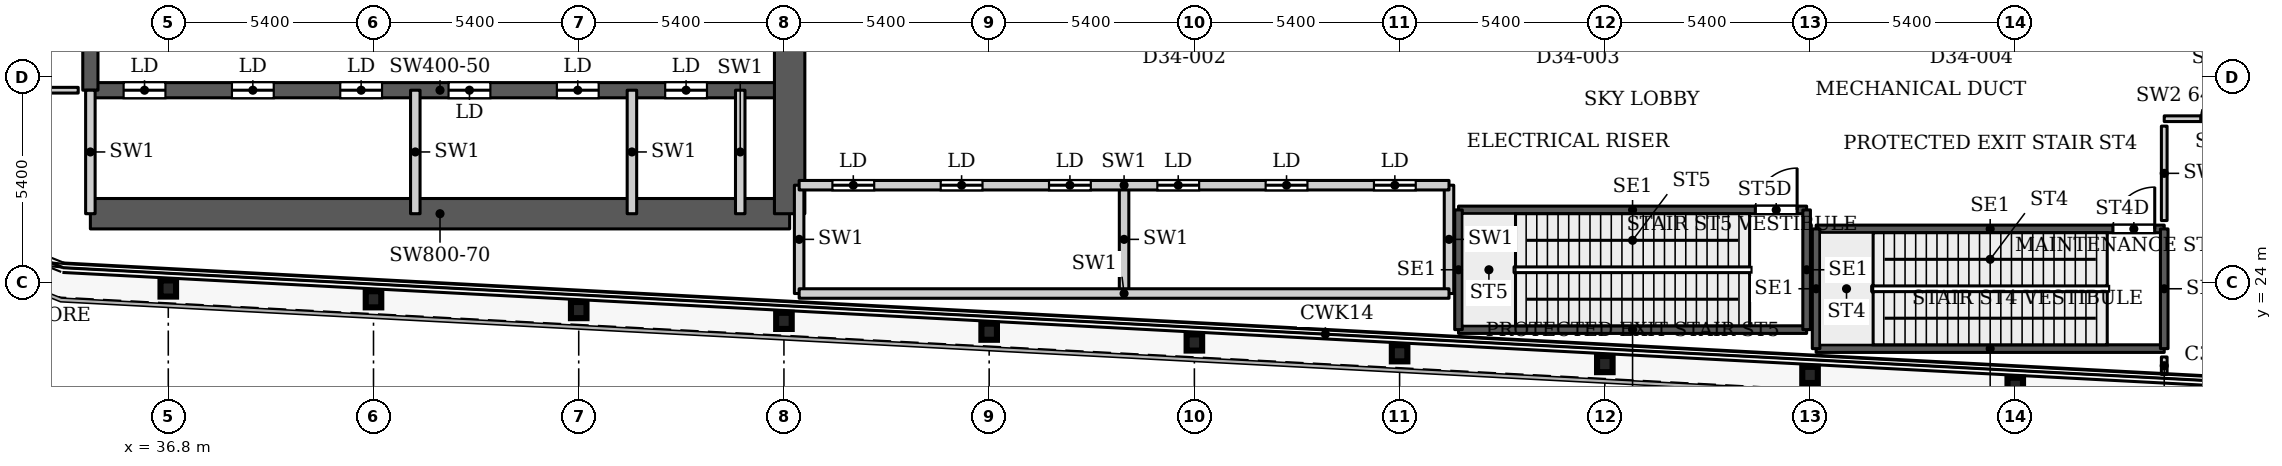
"""IFC4 building model, lengths in metres.
Left out: names, types, materials, properties, quantities, classifications, styles, units other than length and angle.
Written with IfcOpenShell. Run it as: python <this file> out.ifc"""

import sys

from ifc_helpers import new_model, si_unit, direction, frame, frame_2d, origin, origin_2d, place, context, subcontext, project, spatial, rectangle, i_section, extrude, source, transform, mapped, element, fill, save


model = new_model("IFC4")
c1 = context("Model", 3, precision=1e-05, world=origin(), true_north=direction((0.0, 1.0)))
c2 = subcontext(c1, "Body", "Model", "MODEL_VIEW")
j1 = project(units=[si_unit("LENGTHUNIT", "METRE"), si_unit("PLANEANGLEUNIT", "RADIAN")], contexts=[c1])
p1 = place(None, origin())
s1 = spatial("IfcSite", under=j1, at=p1, CompositionType="ELEMENT")
p2 = place(p1, origin())
s2 = spatial("IfcBuilding", under=s1, at=p2, CompositionType="ELEMENT")
p3 = place(p2, frame((0.0, 0.0, 144.8)))
s3 = spatial("IfcBuildingStorey", under=s2, at=p3, CompositionType="ELEMENT", Elevation=144.8)
for number, where, z_axis, x_axis in (
    (1, (85.4, 21.274, 0.0), (0.0, 0.0, 1.0), (1.0, 0.0, 0.0)),
    (2, (80.0, 21.558, 0.0), (0.0, 0.0, 1.0), (1.0, 0.0, 0.0)),
    (3, (74.6, 21.843, 0.0), (0.0, 0.0, 1.0), (1.0, 0.0, 0.0)),
    (4, (69.2, 22.127, 0.0), (0.0, 0.0, 1.0), (1.0, 0.0, 0.0)),
    (5, (63.8, 22.411, 0.0), (0.0, 0.0, 1.0), (1.0, 0.0, 0.0)),
    (6, (58.4, 22.695, 0.0), (0.0, 0.0, 1.0), (1.0, 0.0, 0.0)),
    (7, (53.0, 22.98, 0.0), (0.0, 0.0, 1.0), (1.0, 0.0, 0.0)),
    (8, (47.6, 23.264, 0.0), (0.0, 0.0, 1.0), (1.0, 0.0, 0.0)),
    (9, (42.2, 23.548, 0.0), (0.0, 0.0, 1.0), (1.0, 0.0, 0.0)),
    (10, (36.8, 23.832, 0.0), (0.0, 0.0, 1.0), (1.0, 0.0, 0.0)),
):
    element("IfcColumn", number, at=place(p3, frame(where, z_axis=z_axis, x_axis=x_axis)), inside=s3, PredefinedType="COLUMN", context=c2, shape_type="SweptSolid", body=[
        extrude(i_section(OverallWidth=0.409, OverallDepth=0.425, WebThickness=0.033, FlangeThickness=0.052, FilletRadius=0.013, at=origin_2d()), origin(), (0.0, 0.0, 1.0), 7.8),
    ])
p4 = place(p3, frame((34.75, 25.8, 0.0), z_axis=(0.0, 0.0, 1.0), x_axis=(1.0, 0.0, 0.0)))
e11 = element("IfcWall", 11, at=p4, inside=s3, PredefinedType="SHEAR", context=c2, shape_type="SweptSolid", body=[
    extrude(rectangle(XDim=18.4, YDim=0.8, at=frame_2d((9.2, 0.0))), origin(), (0.0, 0.0, 1.0), 7.8),
])
p5 = place(p3, frame((34.75, 29.05, 0.0), z_axis=(0.0, 0.0, 1.0), x_axis=(1.0, 0.0, 0.0)))
e12 = element("IfcWall", 12, at=p5, inside=s3, PredefinedType="SHEAR", context=c2, shape_type="SweptSolid", body=[
    extrude(rectangle(XDim=18.4, YDim=0.4, at=frame_2d((9.2, 0.0))), origin(), (0.0, 0.0, 1.0), 7.8),
])
p6 = place(p5, frame((0.875, 0.0, 0.0)))
e13 = element("IfcOpeningElement", 13, at=p6, cuts=e12, PredefinedType="OPENING", context=c2, shape_type="SweptSolid", body=[
    extrude(rectangle(XDim=1.1, YDim=2.2, at=frame_2d((0.55, 1.1))), frame((0.0, 0.21, 0.0), z_axis=(0.0, -1.0, 0.0), x_axis=(1.0, 0.0, 0.0)), (0.0, 0.0, 1.0), 0.42),
])
p7 = place(p5, frame((3.725, 0.0, 0.0)))
e14 = element("IfcOpeningElement", 14, at=p7, cuts=e12, PredefinedType="OPENING", context=c2, shape_type="SweptSolid", body=[
    extrude(rectangle(XDim=1.1, YDim=2.2, at=frame_2d((0.55, 1.1))), frame((0.0, 0.21, 0.0), z_axis=(0.0, -1.0, 0.0), x_axis=(1.0, 0.0, 0.0)), (0.0, 0.0, 1.0), 0.42),
])
p8 = place(p5, frame((6.575, 0.0, 0.0)))
e15 = element("IfcOpeningElement", 15, at=p8, cuts=e12, PredefinedType="OPENING", context=c2, shape_type="SweptSolid", body=[
    extrude(rectangle(XDim=1.1, YDim=2.2, at=frame_2d((0.55, 1.1))), frame((0.0, 0.21, 0.0), z_axis=(0.0, -1.0, 0.0), x_axis=(1.0, 0.0, 0.0)), (0.0, 0.0, 1.0), 0.42),
])
p9 = place(p5, frame((9.425, 0.0, 0.0)))
e16 = element("IfcOpeningElement", 16, at=p9, cuts=e12, PredefinedType="OPENING", context=c2, shape_type="SweptSolid", body=[
    extrude(rectangle(XDim=1.1, YDim=2.2, at=frame_2d((0.55, 1.1))), frame((0.0, 0.21, 0.0), z_axis=(0.0, -1.0, 0.0), x_axis=(1.0, 0.0, 0.0)), (0.0, 0.0, 1.0), 0.42),
])
p10 = place(p5, frame((12.275, 0.0, 0.0)))
e17 = element("IfcOpeningElement", 17, at=p10, cuts=e12, PredefinedType="OPENING", context=c2, shape_type="SweptSolid", body=[
    extrude(rectangle(XDim=1.1, YDim=2.2, at=frame_2d((0.55, 1.1))), frame((0.0, 0.21, 0.0), z_axis=(0.0, -1.0, 0.0), x_axis=(1.0, 0.0, 0.0)), (0.0, 0.0, 1.0), 0.42),
])
p11 = place(p5, frame((15.125, 0.0, 0.0)))
e18 = element("IfcOpeningElement", 18, at=p11, cuts=e12, PredefinedType="OPENING", context=c2, shape_type="SweptSolid", body=[
    extrude(rectangle(XDim=1.1, YDim=2.2, at=frame_2d((0.55, 1.1))), frame((0.0, 0.21, 0.0), z_axis=(0.0, -1.0, 0.0), x_axis=(1.0, 0.0, 0.0)), (0.0, 0.0, 1.0), 0.42),
])
p12 = place(p3, frame((34.75, 29.05, 0.0), z_axis=(0.0, 0.0, 1.0), x_axis=(0.0, 1.0, 0.0)))
e19 = element("IfcWall", 19, at=p12, inside=s3, PredefinedType="SHEAR", context=c2, shape_type="SweptSolid", body=[
    extrude(rectangle(XDim=18.45, YDim=0.4, at=frame_2d((9.225, 0.0))), origin(), (0.0, 0.0, 1.0), 7.8),
])
p13 = place(p12, frame((8.025, 0.0, 0.0)))
e20 = element("IfcOpeningElement", 20, at=p13, cuts=e19, PredefinedType="OPENING", context=c2, shape_type="SweptSolid", body=[
    extrude(rectangle(XDim=1.1, YDim=2.2, at=frame_2d((0.55, 1.1))), frame((0.0, 0.21, 0.0), z_axis=(0.0, -1.0, 0.0), x_axis=(1.0, 0.0, 0.0)), (0.0, 0.0, 1.0), 0.42),
])
p14 = place(p12, frame((10.875, 0.0, 0.0)))
e21 = element("IfcOpeningElement", 21, at=p14, cuts=e19, PredefinedType="OPENING", context=c2, shape_type="SweptSolid", body=[
    extrude(rectangle(XDim=1.1, YDim=2.2, at=frame_2d((0.55, 1.1))), frame((0.0, 0.21, 0.0), z_axis=(0.0, -1.0, 0.0), x_axis=(1.0, 0.0, 0.0)), (0.0, 0.0, 1.0), 0.42),
])
p15 = place(p12, frame((13.725, 0.0, 0.0)))
e22 = element("IfcOpeningElement", 22, at=p15, cuts=e19, PredefinedType="OPENING", context=c2, shape_type="SweptSolid", body=[
    extrude(rectangle(XDim=1.1, YDim=2.2, at=frame_2d((0.55, 1.1))), frame((0.0, 0.21, 0.0), z_axis=(0.0, -1.0, 0.0), x_axis=(1.0, 0.0, 0.0)), (0.0, 0.0, 1.0), 0.42),
])
p16 = place(p12, frame((15.95, 0.0, 0.0)))
e23 = element("IfcOpeningElement", 23, at=p16, cuts=e19, PredefinedType="OPENING", context=c2, shape_type="SweptSolid", body=[
    extrude(rectangle(XDim=1.1, YDim=2.2, at=frame_2d((0.55, 1.1))), frame((0.0, 0.21, 0.0), z_axis=(0.0, -1.0, 0.0), x_axis=(1.0, 0.0, 0.0)), (0.0, 0.0, 1.0), 0.42),
])
p17 = place(p3, frame((53.15, 25.8, 0.0), z_axis=(0.0, 0.0, 1.0), x_axis=(0.0, 1.0, 0.0)))
e24 = element("IfcWall", 24, at=p17, inside=s3, PredefinedType="SHEAR", context=c2, shape_type="SweptSolid", body=[
    extrude(rectangle(XDim=10.4, YDim=0.8, at=frame_2d((5.2, 0.0))), origin(), (0.0, 0.0, 1.0), 7.8),
])
p18 = place(p17, frame((6.65, 0.0, 0.0)))
e25 = element("IfcOpeningElement", 25, at=p18, cuts=e24, PredefinedType="OPENING", context=c2, shape_type="SweptSolid", body=[
    extrude(rectangle(XDim=1.8, YDim=2.1, at=frame_2d((0.9, 1.05))), frame((0.0, 0.41, 0.0), z_axis=(0.0, -1.0, 0.0), x_axis=(1.0, 0.0, 0.0)), (0.0, 0.0, 1.0), 0.82),
])
p19 = place(p3, frame((80.16, 22.25, 0.0), z_axis=(0.0, 0.0, 1.0), x_axis=(1.0, 0.0, 0.0)))
e26 = element("IfcWall", 26, at=p19, inside=s3, PredefinedType="SHEAR", context=c2, shape_type="SweptSolid", body=[
    extrude(rectangle(XDim=9.16, YDim=0.2, at=frame_2d((4.58, 0.0))), origin(), (0.0, 0.0, 1.0), 7.8),
])
p20 = place(p3, frame((80.16, 25.4, 0.0), z_axis=(0.0, 0.0, 1.0), x_axis=(1.0, 0.0, 0.0)))
e27 = element("IfcWall", 27, at=p20, inside=s3, PredefinedType="SHEAR", context=c2, shape_type="SweptSolid", body=[
    extrude(rectangle(XDim=9.16, YDim=0.2, at=frame_2d((4.58, 0.0))), origin(), (0.0, 0.0, 1.0), 7.8),
])
p21 = place(p20, frame((7.81, 0.0, 0.0)))
e28 = element("IfcOpeningElement", 28, at=p21, cuts=e27, PredefinedType="OPENING", context=c2, shape_type="SweptSolid", body=[
    extrude(rectangle(XDim=1.1, YDim=2.2, at=frame_2d((0.55, 1.1))), frame((0.0, 0.11, 0.0), z_axis=(0.0, -1.0, 0.0), x_axis=(1.0, 0.0, 0.0)), (0.0, 0.0, 1.0), 0.22),
])
for number, where, z_axis, x_axis in (
    (29, (80.16, 22.25, 0.0), (0.0, 0.0, 1.0), (0.0, 1.0, 0.0)),
    (30, (89.32, 22.25, 0.0), (0.0, 0.0, 1.0), (0.0, 1.0, 0.0)),
):
    element("IfcWall", number, at=place(p3, frame(where, z_axis=z_axis, x_axis=x_axis)), inside=s3, PredefinedType="SHEAR", context=c2, shape_type="SweptSolid", body=[
        extrude(rectangle(XDim=3.15, YDim=0.2, at=frame_2d((1.575, 0.0))), origin(), (0.0, 0.0, 1.0), 7.8),
    ])
p22 = place(p3, frame((70.75, 22.75, 0.0), z_axis=(0.0, 0.0, 1.0), x_axis=(1.0, 0.0, 0.0)))
e31 = element("IfcWall", 31, at=p22, inside=s3, PredefinedType="SHEAR", context=c2, shape_type="SweptSolid", body=[
    extrude(rectangle(XDim=9.16, YDim=0.2, at=frame_2d((4.58, 0.0))), origin(), (0.0, 0.0, 1.0), 7.8),
])
p23 = place(p3, frame((70.75, 25.9, 0.0), z_axis=(0.0, 0.0, 1.0), x_axis=(1.0, 0.0, 0.0)))
e32 = element("IfcWall", 32, at=p23, inside=s3, PredefinedType="SHEAR", context=c2, shape_type="SweptSolid", body=[
    extrude(rectangle(XDim=9.16, YDim=0.2, at=frame_2d((4.58, 0.0))), origin(), (0.0, 0.0, 1.0), 7.8),
])
p24 = place(p23, frame((7.81, 0.0, 0.0)))
e33 = element("IfcOpeningElement", 33, at=p24, cuts=e32, PredefinedType="OPENING", context=c2, shape_type="SweptSolid", body=[
    extrude(rectangle(XDim=1.1, YDim=2.2, at=frame_2d((0.55, 1.1))), frame((0.0, 0.11, 0.0), z_axis=(0.0, -1.0, 0.0), x_axis=(1.0, 0.0, 0.0)), (0.0, 0.0, 1.0), 0.22),
])
for number, where, z_axis, x_axis in (
    (34, (70.75, 22.75, 0.0), (0.0, 0.0, 1.0), (0.0, 1.0, 0.0)),
    (35, (79.91, 22.75, 0.0), (0.0, 0.0, 1.0), (0.0, 1.0, 0.0)),
):
    element("IfcWall", number, at=place(p3, frame(where, z_axis=z_axis, x_axis=x_axis)), inside=s3, PredefinedType="SHEAR", context=c2, shape_type="SweptSolid", body=[
        extrude(rectangle(XDim=3.15, YDim=0.2, at=frame_2d((1.575, 0.0))), origin(), (0.0, 0.0, 1.0), 7.8),
    ])
for number, where, z_axis, x_axis in (
    (36, (34.75, 25.8, 0.0), (0.0, 0.0, 1.0), (0.0, 1.0, 0.0)),
    (37, (43.3, 25.8, 0.0), (0.0, 0.0, 1.0), (0.0, 1.0, 0.0)),
    (38, (49.0, 25.8, 0.0), (0.0, 0.0, 1.0), (0.0, 1.0, 0.0)),
    (39, (51.85, 25.8, 0.0), (0.0, 0.0, 1.0), (0.0, 1.0, 0.0)),
):
    element("IfcWall", number, at=place(p3, frame(where, z_axis=z_axis, x_axis=x_axis)), inside=s3, PredefinedType="PARTITIONING", context=c2, shape_type="SweptSolid", body=[
        extrude(rectangle(XDim=3.25, YDim=0.25, at=frame_2d((1.625, 0.0))), origin(), (0.0, 0.0, 1.0), 7.8),
    ])
for number, where, z_axis, x_axis in (
    (40, (53.4, 23.7, 0.0), (0.0, 0.0, 1.0), (0.0, 1.0, 0.0)),
    (41, (61.95, 23.7, 0.0), (0.0, 0.0, 1.0), (0.0, 1.0, 0.0)),
    (42, (70.5, 23.7, 0.0), (0.0, 0.0, 1.0), (0.0, 1.0, 0.0)),
):
    element("IfcWall", number, at=place(p3, frame(where, z_axis=z_axis, x_axis=x_axis)), inside=s3, PredefinedType="PARTITIONING", context=c2, shape_type="SweptSolid", body=[
        extrude(rectangle(XDim=2.85, YDim=0.25, at=frame_2d((1.425, 0.0))), origin(), (0.0, 0.0, 1.0), 7.8),
    ])
p25 = place(p3, frame((53.4, 23.7, 0.0), z_axis=(0.0, 0.0, 1.0), x_axis=(1.0, 0.0, 0.0)))
e43 = element("IfcWall", 43, at=p25, inside=s3, PredefinedType="PARTITIONING", context=c2, shape_type="SweptSolid", body=[
    extrude(rectangle(XDim=17.1, YDim=0.25, at=frame_2d((8.55, 0.0))), origin(), (0.0, 0.0, 1.0), 7.8),
])
p26 = place(p3, frame((53.4, 26.55, 0.0), z_axis=(0.0, 0.0, 1.0), x_axis=(1.0, 0.0, 0.0)))
e44 = element("IfcWall", 44, at=p26, inside=s3, PredefinedType="PARTITIONING", context=c2, shape_type="SweptSolid", body=[
    extrude(rectangle(XDim=17.1, YDim=0.25, at=frame_2d((8.55, 0.0))), origin(), (0.0, 0.0, 1.0), 7.8),
])
p27 = place(p26, frame((0.875, 0.0, 0.0)))
e45 = element("IfcOpeningElement", 45, at=p27, cuts=e44, PredefinedType="OPENING", context=c2, shape_type="SweptSolid", body=[
    extrude(rectangle(XDim=1.1, YDim=2.2, at=frame_2d((0.55, 1.1))), frame((0.0, 0.135, 0.0), z_axis=(0.0, -1.0, 0.0), x_axis=(1.0, 0.0, 0.0)), (0.0, 0.0, 1.0), 0.27),
])
p28 = place(p26, frame((3.725, 0.0, 0.0)))
e46 = element("IfcOpeningElement", 46, at=p28, cuts=e44, PredefinedType="OPENING", context=c2, shape_type="SweptSolid", body=[
    extrude(rectangle(XDim=1.1, YDim=2.2, at=frame_2d((0.55, 1.1))), frame((0.0, 0.135, 0.0), z_axis=(0.0, -1.0, 0.0), x_axis=(1.0, 0.0, 0.0)), (0.0, 0.0, 1.0), 0.27),
])
p29 = place(p26, frame((6.575, 0.0, 0.0)))
e47 = element("IfcOpeningElement", 47, at=p29, cuts=e44, PredefinedType="OPENING", context=c2, shape_type="SweptSolid", body=[
    extrude(rectangle(XDim=1.1, YDim=2.2, at=frame_2d((0.55, 1.1))), frame((0.0, 0.135, 0.0), z_axis=(0.0, -1.0, 0.0), x_axis=(1.0, 0.0, 0.0)), (0.0, 0.0, 1.0), 0.27),
])
p30 = place(p26, frame((9.425, 0.0, 0.0)))
e48 = element("IfcOpeningElement", 48, at=p30, cuts=e44, PredefinedType="OPENING", context=c2, shape_type="SweptSolid", body=[
    extrude(rectangle(XDim=1.1, YDim=2.2, at=frame_2d((0.55, 1.1))), frame((0.0, 0.135, 0.0), z_axis=(0.0, -1.0, 0.0), x_axis=(1.0, 0.0, 0.0)), (0.0, 0.0, 1.0), 0.27),
])
p31 = place(p26, frame((12.275, 0.0, 0.0)))
e49 = element("IfcOpeningElement", 49, at=p31, cuts=e44, PredefinedType="OPENING", context=c2, shape_type="SweptSolid", body=[
    extrude(rectangle(XDim=1.1, YDim=2.2, at=frame_2d((0.55, 1.1))), frame((0.0, 0.135, 0.0), z_axis=(0.0, -1.0, 0.0), x_axis=(1.0, 0.0, 0.0)), (0.0, 0.0, 1.0), 0.27),
])
p32 = place(p26, frame((15.125, 0.0, 0.0)))
e50 = element("IfcOpeningElement", 50, at=p32, cuts=e44, PredefinedType="OPENING", context=c2, shape_type="SweptSolid", body=[
    extrude(rectangle(XDim=1.1, YDim=2.2, at=frame_2d((0.55, 1.1))), frame((0.0, 0.135, 0.0), z_axis=(0.0, -1.0, 0.0), x_axis=(1.0, 0.0, 0.0)), (0.0, 0.0, 1.0), 0.27),
])
p33 = place(p3, frame((31.02, 29.05, 0.0), z_axis=(0.0, 0.0, 1.0), x_axis=(1.0, 0.0, 0.0)))
e51 = element("IfcWall", 51, at=p33, inside=s3, PredefinedType="PARTITIONING", context=c2, shape_type="SweptSolid", body=[
    extrude(rectangle(XDim=3.41, YDim=0.15, at=frame_2d((1.705, 0.0))), origin(), (0.0, 0.0, 1.0), 7.8),
])
p34 = place(p33, frame((1.155, 0.0, 0.0)))
e52 = element("IfcOpeningElement", 52, at=p34, cuts=e51, PredefinedType="OPENING", context=c2, shape_type="SweptSolid", body=[
    extrude(rectangle(XDim=0.9, YDim=2.2, at=frame_2d((0.45, 1.1))), frame((0.0, 0.085, 0.0), z_axis=(0.0, -1.0, 0.0), x_axis=(1.0, 0.0, 0.0)), (0.0, 0.0, 1.0), 0.17),
])
p35 = place(p3, frame((89.32, 28.3, 0.0), z_axis=(0.0, 0.0, 1.0), x_axis=(1.0, 0.0, 0.0)))
e53 = element("IfcWall", 53, at=p35, inside=s3, PredefinedType="PARTITIONING", context=c2, shape_type="SweptSolid", body=[
    extrude(rectangle(XDim=2.823, YDim=0.15, at=frame_2d((1.412, 0.0))), origin(), (0.0, 0.0, 1.0), 6.4),
])
p36 = place(p35, frame((0.962, 0.0, 0.0)))
e54 = element("IfcOpeningElement", 54, at=p36, cuts=e53, PredefinedType="OPENING", context=c2, shape_type="SweptSolid", body=[
    extrude(rectangle(XDim=0.9, YDim=2.2, at=frame_2d((0.45, 1.1))), frame((0.0, 0.085, 0.0), z_axis=(0.0, -1.0, 0.0), x_axis=(1.0, 0.0, 0.0)), (0.0, 0.0, 1.0), 0.17),
])
p37 = place(p3, frame((89.32, 21.571, 0.0), z_axis=(0.0, 0.0, 1.0), x_axis=(0.0, 1.0, 0.0)))
e55 = element("IfcWall", 55, at=p37, inside=s3, PredefinedType="PARTITIONING", context=c2, shape_type="SweptSolid", body=[
    extrude(rectangle(XDim=0.459, YDim=0.15, at=frame_2d((0.229, 0.0))), origin(), (0.0, 0.0, 1.0), 7.8),
])
p38 = place(p3, frame((89.32, 25.62, 0.0), z_axis=(0.0, 0.0, 1.0), x_axis=(0.0, 1.0, 0.0)))
e56 = element("IfcWall", 56, at=p38, inside=s3, PredefinedType="PARTITIONING", context=c2, shape_type="SweptSolid", body=[
    extrude(rectangle(XDim=2.485, YDim=0.15, at=frame_2d((1.242, 0.0))), origin(), (0.0, 0.0, 1.0), 7.8),
])
m1 = source(origin(), c2, "Body", "SweptSolid", [
    extrude(rectangle(XDim=1.1, YDim=2.2, at=frame_2d((0.55, 1.1))), frame((0.0, 0.025, 0.0), z_axis=(0.0, -1.0, 0.0), x_axis=(1.0, 0.0, 0.0)), (0.0, 0.0, 1.0), 0.05),
])
p39 = place(p27, origin())
e57 = element("IfcDoor", 57, at=p39, inside=s3, OperationType="SLIDING_TO_LEFT", PredefinedType="DOOR", context=c2, shape_type="MappedRepresentation", body=[
    mapped(m1, transform((0.0, 0.0, 0.0), x_axis=(1.0, 0.0, 0.0), y_axis=(0.0, 1.0, 0.0), z_axis=(0.0, 0.0, 1.0), scale=1.0)),
])
fill(e45, e57)
p40 = place(p28, origin())
e58 = element("IfcDoor", 58, at=p40, inside=s3, OperationType="SLIDING_TO_LEFT", PredefinedType="DOOR", context=c2, shape_type="MappedRepresentation", body=[
    mapped(m1, transform((0.0, 0.0, 0.0), x_axis=(1.0, 0.0, 0.0), y_axis=(0.0, 1.0, 0.0), z_axis=(0.0, 0.0, 1.0), scale=1.0)),
])
fill(e46, e58)
p41 = place(p29, origin())
e59 = element("IfcDoor", 59, at=p41, inside=s3, OperationType="SLIDING_TO_LEFT", PredefinedType="DOOR", context=c2, shape_type="MappedRepresentation", body=[
    mapped(m1, transform((0.0, 0.0, 0.0), x_axis=(1.0, 0.0, 0.0), y_axis=(0.0, 1.0, 0.0), z_axis=(0.0, 0.0, 1.0), scale=1.0)),
])
fill(e47, e59)
p42 = place(p30, origin())
e60 = element("IfcDoor", 60, at=p42, inside=s3, OperationType="SLIDING_TO_LEFT", PredefinedType="DOOR", context=c2, shape_type="MappedRepresentation", body=[
    mapped(m1, transform((0.0, 0.0, 0.0), x_axis=(1.0, 0.0, 0.0), y_axis=(0.0, 1.0, 0.0), z_axis=(0.0, 0.0, 1.0), scale=1.0)),
])
fill(e48, e60)
p43 = place(p31, origin())
e61 = element("IfcDoor", 61, at=p43, inside=s3, OperationType="SLIDING_TO_LEFT", PredefinedType="DOOR", context=c2, shape_type="MappedRepresentation", body=[
    mapped(m1, transform((0.0, 0.0, 0.0), x_axis=(1.0, 0.0, 0.0), y_axis=(0.0, 1.0, 0.0), z_axis=(0.0, 0.0, 1.0), scale=1.0)),
])
fill(e49, e61)
p44 = place(p32, origin())
e62 = element("IfcDoor", 62, at=p44, inside=s3, OperationType="SLIDING_TO_LEFT", PredefinedType="DOOR", context=c2, shape_type="MappedRepresentation", body=[
    mapped(m1, transform((0.0, 0.0, 0.0), x_axis=(1.0, 0.0, 0.0), y_axis=(0.0, 1.0, 0.0), z_axis=(0.0, 0.0, 1.0), scale=1.0)),
])
fill(e50, e62)
p45 = place(p6, origin())
e63 = element("IfcDoor", 63, at=p45, inside=s3, OperationType="SLIDING_TO_LEFT", PredefinedType="DOOR", context=c2, shape_type="MappedRepresentation", body=[
    mapped(m1, transform((0.0, 0.0, 0.0), x_axis=(1.0, 0.0, 0.0), y_axis=(0.0, 1.0, 0.0), z_axis=(0.0, 0.0, 1.0), scale=1.0)),
])
fill(e13, e63)
p46 = place(p7, origin())
e64 = element("IfcDoor", 64, at=p46, inside=s3, OperationType="SLIDING_TO_LEFT", PredefinedType="DOOR", context=c2, shape_type="MappedRepresentation", body=[
    mapped(m1, transform((0.0, 0.0, 0.0), x_axis=(1.0, 0.0, 0.0), y_axis=(0.0, 1.0, 0.0), z_axis=(0.0, 0.0, 1.0), scale=1.0)),
])
fill(e14, e64)
p47 = place(p8, origin())
e65 = element("IfcDoor", 65, at=p47, inside=s3, OperationType="SLIDING_TO_LEFT", PredefinedType="DOOR", context=c2, shape_type="MappedRepresentation", body=[
    mapped(m1, transform((0.0, 0.0, 0.0), x_axis=(1.0, 0.0, 0.0), y_axis=(0.0, 1.0, 0.0), z_axis=(0.0, 0.0, 1.0), scale=1.0)),
])
fill(e15, e65)
p48 = place(p9, origin())
e66 = element("IfcDoor", 66, at=p48, inside=s3, OperationType="SLIDING_TO_LEFT", PredefinedType="DOOR", context=c2, shape_type="MappedRepresentation", body=[
    mapped(m1, transform((0.0, 0.0, 0.0), x_axis=(1.0, 0.0, 0.0), y_axis=(0.0, 1.0, 0.0), z_axis=(0.0, 0.0, 1.0), scale=1.0)),
])
fill(e16, e66)
p49 = place(p10, origin())
e67 = element("IfcDoor", 67, at=p49, inside=s3, OperationType="SLIDING_TO_LEFT", PredefinedType="DOOR", context=c2, shape_type="MappedRepresentation", body=[
    mapped(m1, transform((0.0, 0.0, 0.0), x_axis=(1.0, 0.0, 0.0), y_axis=(0.0, 1.0, 0.0), z_axis=(0.0, 0.0, 1.0), scale=1.0)),
])
fill(e17, e67)
p50 = place(p11, origin())
e68 = element("IfcDoor", 68, at=p50, inside=s3, OperationType="SLIDING_TO_LEFT", PredefinedType="DOOR", context=c2, shape_type="MappedRepresentation", body=[
    mapped(m1, transform((0.0, 0.0, 0.0), x_axis=(1.0, 0.0, 0.0), y_axis=(0.0, 1.0, 0.0), z_axis=(0.0, 0.0, 1.0), scale=1.0)),
])
fill(e18, e68)
m2 = source(origin(), c2, "Body", "SweptSolid", [
    extrude(rectangle(XDim=0.9, YDim=2.2, at=frame_2d((0.45, 1.1))), frame((0.0, 0.025, 0.0), z_axis=(0.0, -1.0, 0.0), x_axis=(1.0, 0.0, 0.0)), (0.0, 0.0, 1.0), 0.05),
])
p51 = place(p36, origin())
e69 = element("IfcDoor", 69, at=p51, inside=s3, OperationType="SINGLE_SWING_LEFT", PredefinedType="DOOR", context=c2, shape_type="MappedRepresentation", body=[
    mapped(m2, transform((0.0, 0.0, 0.0), x_axis=(1.0, 0.0, 0.0), y_axis=(0.0, 1.0, 0.0), z_axis=(0.0, 0.0, 1.0), scale=1.0)),
])
fill(e54, e69)
m3 = source(origin(), c2, "Body", "SweptSolid", [
    extrude(rectangle(XDim=1.1, YDim=2.2, at=frame_2d((0.55, 1.1))), frame((0.0, 0.025, 0.0), z_axis=(0.0, -1.0, 0.0), x_axis=(1.0, 0.0, 0.0)), (0.0, 0.0, 1.0), 0.05),
])
p52 = place(p21, origin())
e70 = element("IfcDoor", 70, at=p52, inside=s3, OperationType="SINGLE_SWING_LEFT", PredefinedType="DOOR", context=c2, shape_type="MappedRepresentation", body=[
    mapped(m3, transform((0.0, 0.0, 0.0), x_axis=(1.0, 0.0, 0.0), y_axis=(0.0, 1.0, 0.0), z_axis=(0.0, 0.0, 1.0), scale=1.0)),
])
fill(e28, e70)
p53 = place(p24, origin())
e71 = element("IfcDoor", 71, at=p53, inside=s3, OperationType="SINGLE_SWING_LEFT", PredefinedType="DOOR", context=c2, shape_type="MappedRepresentation", body=[
    mapped(m3, transform((0.0, 0.0, 0.0), x_axis=(1.0, 0.0, 0.0), y_axis=(0.0, 1.0, 0.0), z_axis=(0.0, 0.0, 1.0), scale=1.0)),
])
fill(e33, e71)
save(model, sys.argv[1])
